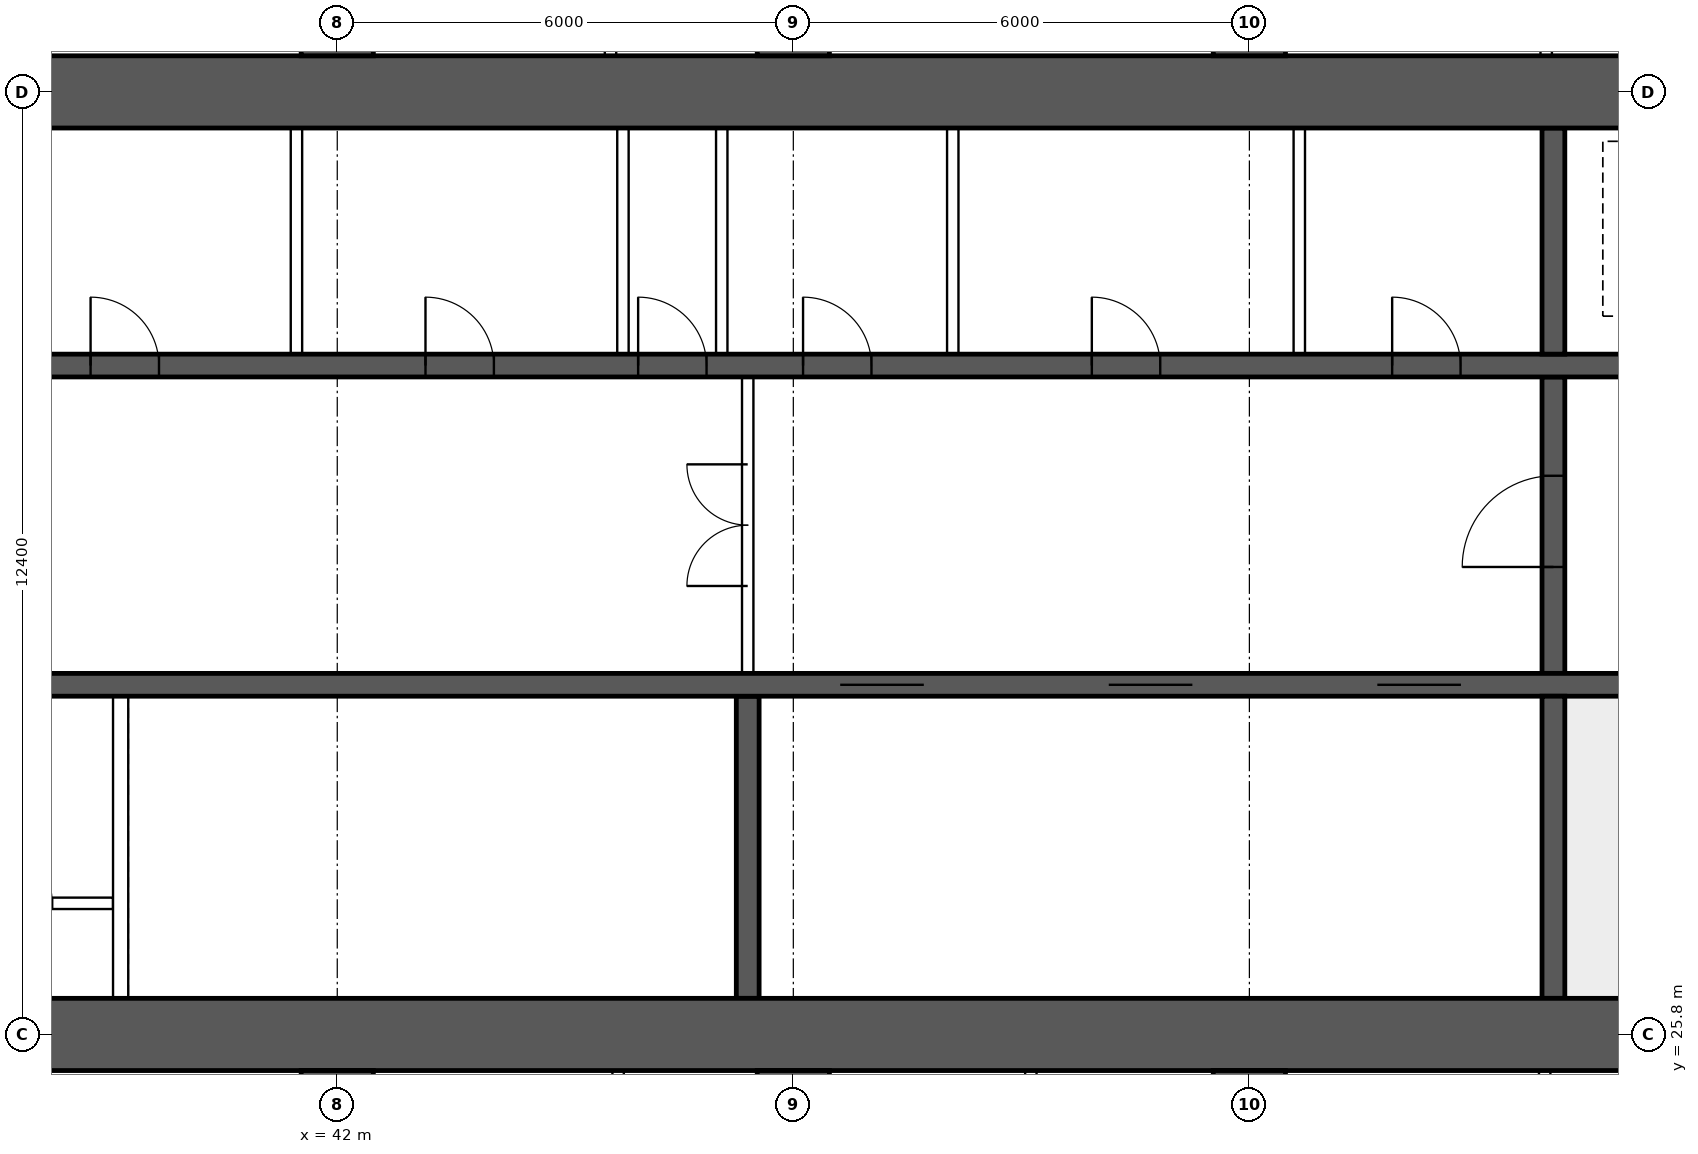
"""IFC4 building model, lengths in metres.
Left out: names, types, materials, properties, quantities, classifications, styles, units other than length and angle.
Written with IfcOpenShell. Run it as: python <this file> out.ifc"""

import sys

from ifc_helpers import new_model, si_unit, direction, frame, frame_2d, origin, place, context, subcontext, project, spatial, rectangle, extrude, element, fill, save


model = new_model("IFC4")
c1 = context("Model", 3, precision=1e-05, world=origin(), true_north=direction((0.0, 1.0)))
c2 = subcontext(c1, "Body", "Model", "MODEL_VIEW")
j1 = project(units=[si_unit("LENGTHUNIT", "METRE"), si_unit("PLANEANGLEUNIT", "RADIAN")], contexts=[c1])
p1 = place(None, origin())
s1 = spatial("IfcSite", under=j1, at=p1, CompositionType="ELEMENT")
p2 = place(p1, origin())
s2 = spatial("IfcBuilding", under=s1, at=p2, CompositionType="ELEMENT")
p3 = place(p2, frame((0.0, 0.0, 103.15)))
s3 = spatial("IfcBuildingStorey", under=s2, at=p3, CompositionType="ELEMENT", Elevation=103.15)
for number, where, z_axis, x_axis in (
    (1, (18.0, 25.8, 0.0), (0.0, 0.0, 1.0), (1.0, 0.0, 0.0)),
    (2, (18.0, 38.2, 0.0), (0.0, 0.0, 1.0), (1.0, 0.0, 0.0)),
):
    element("IfcWall", number, at=place(p3, frame(where, z_axis=z_axis, x_axis=x_axis)), inside=s3, PredefinedType="SHEAR", context=c2, shape_type="SweptSolid", body=[
        extrude(rectangle(XDim=48.0, YDim=0.95, at=frame_2d((24.0, 0.0))), origin(), (0.0, 0.0, 1.0), 3.75),
    ])
p4 = place(p3, frame((18.475, 30.4, 0.0), z_axis=(0.0, 0.0, 1.0), x_axis=(1.0, 0.0, 0.0)))
e3 = element("IfcWall", 3, at=p4, inside=s3, PredefinedType="SHEAR", context=c2, shape_type="SweptSolid", body=[
    extrude(rectangle(XDim=47.05, YDim=0.3, at=frame_2d((23.525, 0.0))), origin(), (0.0, 0.0, 1.0), 3.75),
])
p5 = place(p4, frame((0.4, 0.0, 0.0)))
e4 = element("IfcOpeningElement", 4, at=p5, cuts=e3, PredefinedType="OPENING", context=c2, shape_type="SweptSolid", body=[
    extrude(rectangle(XDim=1.0, YDim=2.1, at=frame_2d((0.5, 1.05))), frame((0.0, 0.16, 0.0), z_axis=(0.0, -1.0, 0.0), x_axis=(1.0, 0.0, 0.0)), (0.0, 0.0, 1.0), 0.32),
])
p6 = place(p4, frame((45.65, 0.0, 0.0)))
e5 = element("IfcOpeningElement", 5, at=p6, cuts=e3, PredefinedType="OPENING", context=c2, shape_type="SweptSolid", body=[
    extrude(rectangle(XDim=1.0, YDim=2.1, at=frame_2d((0.5, 1.05))), frame((0.0, 0.16, 0.0), z_axis=(0.0, -1.0, 0.0), x_axis=(1.0, 0.0, 0.0)), (0.0, 0.0, 1.0), 0.32),
])
p7 = place(p4, frame((8.275, 0.0, 0.0)))
e6 = element("IfcOpeningElement", 6, at=p7, cuts=e3, PredefinedType="OPENING", context=c2, shape_type="SweptSolid", body=[
    extrude(rectangle(XDim=1.1, YDim=2.1, at=frame_2d((0.55, 1.05))), frame((0.0, 0.16, 0.0), z_axis=(0.0, -1.0, 0.0), x_axis=(1.0, 0.0, 0.0)), (0.0, 0.0, 1.0), 0.32),
])
p8 = place(p4, frame((10.875, 0.0, 0.0)))
e7 = element("IfcOpeningElement", 7, at=p8, cuts=e3, PredefinedType="OPENING", context=c2, shape_type="SweptSolid", body=[
    extrude(rectangle(XDim=1.1, YDim=2.1, at=frame_2d((0.55, 1.05))), frame((0.0, 0.16, 0.0), z_axis=(0.0, -1.0, 0.0), x_axis=(1.0, 0.0, 0.0)), (0.0, 0.0, 1.0), 0.32),
])
p9 = place(p4, frame((13.475, 0.0, 0.0)))
e8 = element("IfcOpeningElement", 8, at=p9, cuts=e3, PredefinedType="OPENING", context=c2, shape_type="SweptSolid", body=[
    extrude(rectangle(XDim=1.1, YDim=2.1, at=frame_2d((0.55, 1.05))), frame((0.0, 0.16, 0.0), z_axis=(0.0, -1.0, 0.0), x_axis=(1.0, 0.0, 0.0)), (0.0, 0.0, 1.0), 0.32),
])
p10 = place(p4, frame((16.075, 0.0, 0.0)))
e9 = element("IfcOpeningElement", 9, at=p10, cuts=e3, PredefinedType="OPENING", context=c2, shape_type="SweptSolid", body=[
    extrude(rectangle(XDim=1.1, YDim=2.1, at=frame_2d((0.55, 1.05))), frame((0.0, 0.16, 0.0), z_axis=(0.0, -1.0, 0.0), x_axis=(1.0, 0.0, 0.0)), (0.0, 0.0, 1.0), 0.32),
])
p11 = place(p4, frame((18.85, 0.0, 0.0)))
e10 = element("IfcOpeningElement", 10, at=p11, cuts=e3, PredefinedType="OPENING", context=c2, shape_type="SweptSolid", body=[
    extrude(rectangle(XDim=0.9, YDim=2.1, at=frame_2d((0.45, 1.05))), frame((0.0, 0.16, 0.0), z_axis=(0.0, -1.0, 0.0), x_axis=(1.0, 0.0, 0.0)), (0.0, 0.0, 1.0), 0.32),
])
p12 = place(p4, frame((30.142, 0.0, 0.0)))
e11 = element("IfcOpeningElement", 11, at=p12, cuts=e3, PredefinedType="OPENING", context=c2, shape_type="SweptSolid", body=[
    extrude(rectangle(XDim=1.1, YDim=2.1, at=frame_2d((0.55, 1.05))), frame((0.0, 0.16, 0.0), z_axis=(0.0, -1.0, 0.0), x_axis=(1.0, 0.0, 0.0)), (0.0, 0.0, 1.0), 0.32),
])
p13 = place(p4, frame((33.675, 0.0, 0.0)))
e12 = element("IfcOpeningElement", 12, at=p13, cuts=e3, PredefinedType="OPENING", context=c2, shape_type="SweptSolid", body=[
    extrude(rectangle(XDim=1.1, YDim=2.1, at=frame_2d((0.55, 1.05))), frame((0.0, 0.16, 0.0), z_axis=(0.0, -1.0, 0.0), x_axis=(1.0, 0.0, 0.0)), (0.0, 0.0, 1.0), 0.32),
])
p14 = place(p4, frame((37.208, 0.0, 0.0)))
e13 = element("IfcOpeningElement", 13, at=p14, cuts=e3, PredefinedType="OPENING", context=c2, shape_type="SweptSolid", body=[
    extrude(rectangle(XDim=1.1, YDim=2.1, at=frame_2d((0.55, 1.05))), frame((0.0, 0.16, 0.0), z_axis=(0.0, -1.0, 0.0), x_axis=(1.0, 0.0, 0.0)), (0.0, 0.0, 1.0), 0.32),
])
p15 = place(p3, frame((18.475, 34.6, 0.0), z_axis=(0.0, 0.0, 1.0), x_axis=(1.0, 0.0, 0.0)))
e14 = element("IfcWall", 14, at=p15, inside=s3, PredefinedType="SHEAR", context=c2, shape_type="SweptSolid", body=[
    extrude(rectangle(XDim=47.05, YDim=0.3, at=frame_2d((23.525, 0.0))), origin(), (0.0, 0.0, 1.0), 3.75),
])
p16 = place(p15, frame((0.9, 0.0, 0.0)))
e15 = element("IfcOpeningElement", 15, at=p16, cuts=e14, PredefinedType="OPENING", context=c2, shape_type="SweptSolid", body=[
    extrude(rectangle(XDim=1.1, YDim=2.1, at=frame_2d((0.55, 1.05))), frame((0.0, 0.16, 0.0), z_axis=(0.0, -1.0, 0.0), x_axis=(1.0, 0.0, 0.0)), (0.0, 0.0, 1.0), 0.32),
])
p17 = place(p15, frame((45.05, 0.0, 0.0)))
e16 = element("IfcOpeningElement", 16, at=p17, cuts=e14, PredefinedType="OPENING", context=c2, shape_type="SweptSolid", body=[
    extrude(rectangle(XDim=1.1, YDim=2.1, at=frame_2d((0.55, 1.05))), frame((0.0, 0.16, 0.0), z_axis=(0.0, -1.0, 0.0), x_axis=(1.0, 0.0, 0.0)), (0.0, 0.0, 1.0), 0.32),
])
p18 = place(p15, frame((4.125, 0.0, 0.0)))
e17 = element("IfcOpeningElement", 17, at=p18, cuts=e14, PredefinedType="OPENING", context=c2, shape_type="SweptSolid", body=[
    extrude(rectangle(XDim=0.9, YDim=2.1, at=frame_2d((0.45, 1.05))), frame((0.0, 0.16, 0.0), z_axis=(0.0, -1.0, 0.0), x_axis=(1.0, 0.0, 0.0)), (0.0, 0.0, 1.0), 0.32),
])
p19 = place(p15, frame((42.025, 0.0, 0.0)))
e18 = element("IfcOpeningElement", 18, at=p19, cuts=e14, PredefinedType="OPENING", context=c2, shape_type="SweptSolid", body=[
    extrude(rectangle(XDim=0.9, YDim=2.1, at=frame_2d((0.45, 1.05))), frame((0.0, 0.16, 0.0), z_axis=(0.0, -1.0, 0.0), x_axis=(1.0, 0.0, 0.0)), (0.0, 0.0, 1.0), 0.32),
])
p20 = place(p15, frame((8.9, 0.0, 0.0)))
e19 = element("IfcOpeningElement", 19, at=p20, cuts=e14, PredefinedType="OPENING", context=c2, shape_type="SweptSolid", body=[
    extrude(rectangle(XDim=0.9, YDim=2.1, at=frame_2d((0.45, 1.05))), frame((0.0, 0.16, 0.0), z_axis=(0.0, -1.0, 0.0), x_axis=(1.0, 0.0, 0.0)), (0.0, 0.0, 1.0), 0.32),
])
p21 = place(p15, frame((12.874, 0.0, 0.0)))
e20 = element("IfcOpeningElement", 20, at=p21, cuts=e14, PredefinedType="OPENING", context=c2, shape_type="SweptSolid", body=[
    extrude(rectangle(XDim=0.9, YDim=2.1, at=frame_2d((0.45, 1.05))), frame((0.0, 0.16, 0.0), z_axis=(0.0, -1.0, 0.0), x_axis=(1.0, 0.0, 0.0)), (0.0, 0.0, 1.0), 0.32),
])
p22 = place(p15, frame((16.521, 0.0, 0.0)))
e21 = element("IfcOpeningElement", 21, at=p22, cuts=e14, PredefinedType="OPENING", context=c2, shape_type="SweptSolid", body=[
    extrude(rectangle(XDim=0.9, YDim=2.1, at=frame_2d((0.45, 1.05))), frame((0.0, 0.16, 0.0), z_axis=(0.0, -1.0, 0.0), x_axis=(1.0, 0.0, 0.0)), (0.0, 0.0, 1.0), 0.32),
])
p23 = place(p15, frame((20.28, 0.0, 0.0)))
e22 = element("IfcOpeningElement", 22, at=p23, cuts=e14, PredefinedType="OPENING", context=c2, shape_type="SweptSolid", body=[
    extrude(rectangle(XDim=0.9, YDim=2.1, at=frame_2d((0.45, 1.05))), frame((0.0, 0.16, 0.0), z_axis=(0.0, -1.0, 0.0), x_axis=(1.0, 0.0, 0.0)), (0.0, 0.0, 1.0), 0.32),
])
p24 = place(p15, frame((24.686, 0.0, 0.0)))
e23 = element("IfcOpeningElement", 23, at=p24, cuts=e14, PredefinedType="OPENING", context=c2, shape_type="SweptSolid", body=[
    extrude(rectangle(XDim=0.9, YDim=2.1, at=frame_2d((0.45, 1.05))), frame((0.0, 0.16, 0.0), z_axis=(0.0, -1.0, 0.0), x_axis=(1.0, 0.0, 0.0)), (0.0, 0.0, 1.0), 0.32),
])
p25 = place(p15, frame((27.483, 0.0, 0.0)))
e24 = element("IfcOpeningElement", 24, at=p25, cuts=e14, PredefinedType="OPENING", context=c2, shape_type="SweptSolid", body=[
    extrude(rectangle(XDim=0.9, YDim=2.1, at=frame_2d((0.45, 1.05))), frame((0.0, 0.16, 0.0), z_axis=(0.0, -1.0, 0.0), x_axis=(1.0, 0.0, 0.0)), (0.0, 0.0, 1.0), 0.32),
])
p26 = place(p15, frame((29.653, 0.0, 0.0)))
e25 = element("IfcOpeningElement", 25, at=p26, cuts=e14, PredefinedType="OPENING", context=c2, shape_type="SweptSolid", body=[
    extrude(rectangle(XDim=0.9, YDim=2.1, at=frame_2d((0.45, 1.05))), frame((0.0, 0.16, 0.0), z_axis=(0.0, -1.0, 0.0), x_axis=(1.0, 0.0, 0.0)), (0.0, 0.0, 1.0), 0.32),
])
p27 = place(p15, frame((33.452, 0.0, 0.0)))
e26 = element("IfcOpeningElement", 26, at=p27, cuts=e14, PredefinedType="OPENING", context=c2, shape_type="SweptSolid", body=[
    extrude(rectangle(XDim=0.9, YDim=2.1, at=frame_2d((0.45, 1.05))), frame((0.0, 0.16, 0.0), z_axis=(0.0, -1.0, 0.0), x_axis=(1.0, 0.0, 0.0)), (0.0, 0.0, 1.0), 0.32),
])
p28 = place(p15, frame((37.403, 0.0, 0.0)))
e27 = element("IfcOpeningElement", 27, at=p28, cuts=e14, PredefinedType="OPENING", context=c2, shape_type="SweptSolid", body=[
    extrude(rectangle(XDim=0.9, YDim=2.1, at=frame_2d((0.45, 1.05))), frame((0.0, 0.16, 0.0), z_axis=(0.0, -1.0, 0.0), x_axis=(1.0, 0.0, 0.0)), (0.0, 0.0, 1.0), 0.32),
])
p29 = place(p3, frame((58.0, 26.275, 0.0), z_axis=(0.0, 0.0, 1.0), x_axis=(0.0, 1.0, 0.0)))
e28 = element("IfcWall", 28, at=p29, inside=s3, PredefinedType="SHEAR", context=c2, shape_type="SweptSolid", body=[
    extrude(rectangle(XDim=3.975, YDim=0.3, at=frame_2d((1.988, 0.0))), origin(), (0.0, 0.0, 1.0), 3.75),
])
p30 = place(p3, frame((58.0, 30.55, 0.0), z_axis=(0.0, 0.0, 1.0), x_axis=(0.0, 1.0, 0.0)))
e29 = element("IfcWall", 29, at=p30, inside=s3, PredefinedType="SHEAR", context=c2, shape_type="SweptSolid", body=[
    extrude(rectangle(XDim=3.9, YDim=0.3, at=frame_2d((1.95, 0.0))), origin(), (0.0, 0.0, 1.0), 3.75),
])
p31 = place(p30, frame((1.4, 0.0, 0.0)))
e30 = element("IfcOpeningElement", 30, at=p31, cuts=e29, PredefinedType="OPENING", context=c2, shape_type="SweptSolid", body=[
    extrude(rectangle(XDim=1.2, YDim=2.1, at=frame_2d((0.6, 1.05))), frame((0.0, 0.16, 0.0), z_axis=(0.0, -1.0, 0.0), x_axis=(1.0, 0.0, 0.0)), (0.0, 0.0, 1.0), 0.32),
])
p32 = place(p3, frame((58.0, 34.75, 0.0), z_axis=(0.0, 0.0, 1.0), x_axis=(0.0, 1.0, 0.0)))
e31 = element("IfcWall", 31, at=p32, inside=s3, PredefinedType="SHEAR", context=c2, shape_type="SweptSolid", body=[
    extrude(rectangle(XDim=2.975, YDim=0.3, at=frame_2d((1.488, 0.0))), origin(), (0.0, 0.0, 1.0), 3.75),
])
p33 = place(p3, frame((47.4, 26.275, 0.0), z_axis=(0.0, 0.0, 1.0), x_axis=(0.0, 1.0, 0.0)))
e32 = element("IfcWall", 32, at=p33, inside=s3, PredefinedType="SHEAR", context=c2, shape_type="SweptSolid", body=[
    extrude(rectangle(XDim=3.975, YDim=0.3, at=frame_2d((1.988, 0.0))), origin(), (0.0, 0.0, 1.0), 3.75),
])
for number, where, z_axis, x_axis in (
    (33, (42.0, 16.0, 0.0), (0.0, 0.0, 1.0), (0.0, 1.0, 0.0)),
    (34, (42.0, 38.675, 0.0), (0.0, 0.0, 1.0), (0.0, 1.0, 0.0)),
    (35, (48.0, 16.0, 0.0), (0.0, 0.0, 1.0), (0.0, 1.0, 0.0)),
    (36, (48.0, 38.675, 0.0), (0.0, 0.0, 1.0), (0.0, 1.0, 0.0)),
    (37, (54.0, 16.0, 0.0), (0.0, 0.0, 1.0), (0.0, 1.0, 0.0)),
    (38, (54.0, 38.675, 0.0), (0.0, 0.0, 1.0), (0.0, 1.0, 0.0)),
):
    element("IfcWall", number, at=place(p3, frame(where, z_axis=z_axis, x_axis=x_axis)), inside=s3, PredefinedType="SHEAR", context=c2, shape_type="SweptSolid", body=[
        extrude(rectangle(XDim=9.325, YDim=0.95, at=frame_2d((4.663, 0.0))), origin(), (0.0, 0.0, 1.0), 3.75),
    ])
p34 = place(p3, frame((47.4, 30.55, 0.0), z_axis=(0.0, 0.0, 1.0), x_axis=(0.0, 1.0, 0.0)))
e39 = element("IfcWall", 39, at=p34, inside=s3, PredefinedType="SOLIDWALL", context=c2, shape_type="SweptSolid", body=[
    extrude(rectangle(XDim=3.9, YDim=0.15, at=frame_2d((1.95, 0.0))), origin(), (0.0, 0.0, 1.0), 3.5),
])
p35 = place(p34, frame((1.15, 0.0, 0.0)))
e40 = element("IfcOpeningElement", 40, at=p35, cuts=e39, PredefinedType="OPENING", context=c2, shape_type="SweptSolid", body=[
    extrude(rectangle(XDim=1.6, YDim=2.1, at=frame_2d((0.8, 1.05))), frame((0.0, 0.085, 0.0), z_axis=(0.0, -1.0, 0.0), x_axis=(1.0, 0.0, 0.0)), (0.0, 0.0, 1.0), 0.17),
])
for number, where, z_axis, x_axis in (
    (41, (41.463, 34.75, 0.0), (0.0, 0.0, 1.0), (0.0, 1.0, 0.0)),
    (42, (45.758, 34.75, 0.0), (0.0, 0.0, 1.0), (0.0, 1.0, 0.0)),
    (43, (47.058, 34.75, 0.0), (0.0, 0.0, 1.0), (0.0, 1.0, 0.0)),
    (44, (50.098, 34.75, 0.0), (0.0, 0.0, 1.0), (0.0, 1.0, 0.0)),
    (45, (54.657, 34.75, 0.0), (0.0, 0.0, 1.0), (0.0, 1.0, 0.0)),
):
    element("IfcWall", number, at=place(p3, frame(where, z_axis=z_axis, x_axis=x_axis)), inside=s3, PredefinedType="SOLIDWALL", context=c2, shape_type="SweptSolid", body=[
        extrude(rectangle(XDim=2.975, YDim=0.15, at=frame_2d((1.488, 0.0))), origin(), (0.0, 0.0, 1.0), 3.5),
    ])
p36 = place(p3, frame((36.55, 27.525, 0.0), z_axis=(0.0, 0.0, 1.0), x_axis=(1.0, 0.0, 0.0)))
e46 = element("IfcWall", 46, at=p36, inside=s3, PredefinedType="SOLIDWALL", context=c2, shape_type="SweptSolid", body=[
    extrude(rectangle(XDim=2.5, YDim=0.15, at=frame_2d((1.25, 0.0))), origin(), (0.0, 0.0, 1.0), 3.5),
])
p37 = place(p36, frame((0.8, 0.0, 0.0)))
e47 = element("IfcOpeningElement", 47, at=p37, cuts=e46, PredefinedType="OPENING", context=c2, shape_type="SweptSolid", body=[
    extrude(rectangle(XDim=0.9, YDim=2.1, at=frame_2d((0.45, 1.05))), frame((0.0, 0.085, 0.0), z_axis=(0.0, -1.0, 0.0), x_axis=(1.0, 0.0, 0.0)), (0.0, 0.0, 1.0), 0.17),
])
p38 = place(p3, frame((39.15, 26.275, 0.0), z_axis=(0.0, 0.0, 1.0), x_axis=(0.0, 1.0, 0.0)))
e48 = element("IfcWall", 48, at=p38, inside=s3, PredefinedType="SOLIDWALL", context=c2, shape_type="SweptSolid", body=[
    extrude(rectangle(XDim=3.975, YDim=0.2, at=frame_2d((1.988, 0.0))), origin(), (0.0, 0.0, 1.0), 3.5),
])
for number, where, z_axis, x_axis in (
    (49, (45.695, 16.1, 0.0), (0.0, 0.0, 1.0), (0.0, 1.0, 0.0)),
    (50, (51.125, 16.1, 0.0), (0.0, 0.0, 1.0), (0.0, 1.0, 0.0)),
    (51, (57.885, 16.1, 0.0), (0.0, 0.0, 1.0), (0.0, 1.0, 0.0)),
    (52, (45.595, 38.675, 0.0), (0.0, 0.0, 1.0), (0.0, 1.0, 0.0)),
    (53, (57.905, 38.675, 0.0), (0.0, 0.0, 1.0), (0.0, 1.0, 0.0)),
):
    element("IfcWall", number, at=place(p3, frame(where, z_axis=z_axis, x_axis=x_axis)), inside=s3, PredefinedType="PARTITIONING", context=c2, shape_type="SweptSolid", body=[
        extrude(rectangle(XDim=9.225, YDim=0.15, at=frame_2d((4.612, 0.0))), origin(), (0.0, 0.0, 1.0), 3.5),
    ])
p39 = place(p35, origin())
e54 = element("IfcDoor", 54, at=p39, inside=s3, OperationType="DOUBLE_DOOR_SINGLE_SWING", PredefinedType="DOOR", context=c2, shape_type="SweptSolid", body=[
    extrude(rectangle(XDim=1.6, YDim=2.1, at=frame_2d((0.8, 1.05))), frame((0.0, 0.025, 0.0), z_axis=(0.0, -1.0, 0.0), x_axis=(1.0, 0.0, 0.0)), (0.0, 0.0, 1.0), 0.05),
])
fill(e40, e54)
p40 = place(p31, origin())
e55 = element("IfcDoor", 55, at=p40, inside=s3, OperationType="SINGLE_SWING_LEFT", PredefinedType="DOOR", context=c2, shape_type="SweptSolid", body=[
    extrude(rectangle(XDim=1.2, YDim=2.1, at=frame_2d((0.6, 1.05))), frame((0.0, 0.025, 0.0), z_axis=(0.0, -1.0, 0.0), x_axis=(1.0, 0.0, 0.0)), (0.0, 0.0, 1.0), 0.05),
])
fill(e30, e55)
p41 = place(p23, origin())
e56 = element("IfcDoor", 56, at=p41, inside=s3, OperationType="SINGLE_SWING_LEFT", PredefinedType="DOOR", context=c2, shape_type="SweptSolid", body=[
    extrude(rectangle(XDim=0.9, YDim=2.1, at=frame_2d((0.45, 1.05))), frame((0.0, 0.025, 0.0), z_axis=(0.0, -1.0, 0.0), x_axis=(1.0, 0.0, 0.0)), (0.0, 0.0, 1.0), 0.05),
])
fill(e22, e56)
p42 = place(p24, origin())
e57 = element("IfcDoor", 57, at=p42, inside=s3, OperationType="SINGLE_SWING_LEFT", PredefinedType="DOOR", context=c2, shape_type="SweptSolid", body=[
    extrude(rectangle(XDim=0.9, YDim=2.1, at=frame_2d((0.45, 1.05))), frame((0.0, 0.025, 0.0), z_axis=(0.0, -1.0, 0.0), x_axis=(1.0, 0.0, 0.0)), (0.0, 0.0, 1.0), 0.05),
])
fill(e23, e57)
p43 = place(p25, origin())
e58 = element("IfcDoor", 58, at=p43, inside=s3, OperationType="SINGLE_SWING_LEFT", PredefinedType="DOOR", context=c2, shape_type="SweptSolid", body=[
    extrude(rectangle(XDim=0.9, YDim=2.1, at=frame_2d((0.45, 1.05))), frame((0.0, 0.025, 0.0), z_axis=(0.0, -1.0, 0.0), x_axis=(1.0, 0.0, 0.0)), (0.0, 0.0, 1.0), 0.05),
])
fill(e24, e58)
p44 = place(p26, origin())
e59 = element("IfcDoor", 59, at=p44, inside=s3, OperationType="SINGLE_SWING_LEFT", PredefinedType="DOOR", context=c2, shape_type="SweptSolid", body=[
    extrude(rectangle(XDim=0.9, YDim=2.1, at=frame_2d((0.45, 1.05))), frame((0.0, 0.025, 0.0), z_axis=(0.0, -1.0, 0.0), x_axis=(1.0, 0.0, 0.0)), (0.0, 0.0, 1.0), 0.05),
])
fill(e25, e59)
p45 = place(p27, origin())
e60 = element("IfcDoor", 60, at=p45, inside=s3, OperationType="SINGLE_SWING_LEFT", PredefinedType="DOOR", context=c2, shape_type="SweptSolid", body=[
    extrude(rectangle(XDim=0.9, YDim=2.1, at=frame_2d((0.45, 1.05))), frame((0.0, 0.025, 0.0), z_axis=(0.0, -1.0, 0.0), x_axis=(1.0, 0.0, 0.0)), (0.0, 0.0, 1.0), 0.05),
])
fill(e26, e60)
p46 = place(p28, origin())
e61 = element("IfcDoor", 61, at=p46, inside=s3, OperationType="SINGLE_SWING_LEFT", PredefinedType="DOOR", context=c2, shape_type="SweptSolid", body=[
    extrude(rectangle(XDim=0.9, YDim=2.1, at=frame_2d((0.45, 1.05))), frame((0.0, 0.025, 0.0), z_axis=(0.0, -1.0, 0.0), x_axis=(1.0, 0.0, 0.0)), (0.0, 0.0, 1.0), 0.05),
])
fill(e27, e61)
p47 = place(p12, origin())
e62 = element("IfcDoor", 62, at=p47, inside=s3, OperationType="DOUBLE_DOOR_SLIDING", PredefinedType="DOOR", context=c2, shape_type="SweptSolid", body=[
    extrude(rectangle(XDim=1.1, YDim=2.1, at=frame_2d((0.55, 1.05))), frame((0.0, 0.025, 0.0), z_axis=(0.0, -1.0, 0.0), x_axis=(1.0, 0.0, 0.0)), (0.0, 0.0, 1.0), 0.05),
])
fill(e11, e62)
p48 = place(p13, origin())
e63 = element("IfcDoor", 63, at=p48, inside=s3, OperationType="DOUBLE_DOOR_SLIDING", PredefinedType="DOOR", context=c2, shape_type="SweptSolid", body=[
    extrude(rectangle(XDim=1.1, YDim=2.1, at=frame_2d((0.55, 1.05))), frame((0.0, 0.025, 0.0), z_axis=(0.0, -1.0, 0.0), x_axis=(1.0, 0.0, 0.0)), (0.0, 0.0, 1.0), 0.05),
])
fill(e12, e63)
p49 = place(p14, origin())
e64 = element("IfcDoor", 64, at=p49, inside=s3, OperationType="DOUBLE_DOOR_SLIDING", PredefinedType="DOOR", context=c2, shape_type="SweptSolid", body=[
    extrude(rectangle(XDim=1.1, YDim=2.1, at=frame_2d((0.55, 1.05))), frame((0.0, 0.025, 0.0), z_axis=(0.0, -1.0, 0.0), x_axis=(1.0, 0.0, 0.0)), (0.0, 0.0, 1.0), 0.05),
])
fill(e13, e64)
save(model, sys.argv[1])
